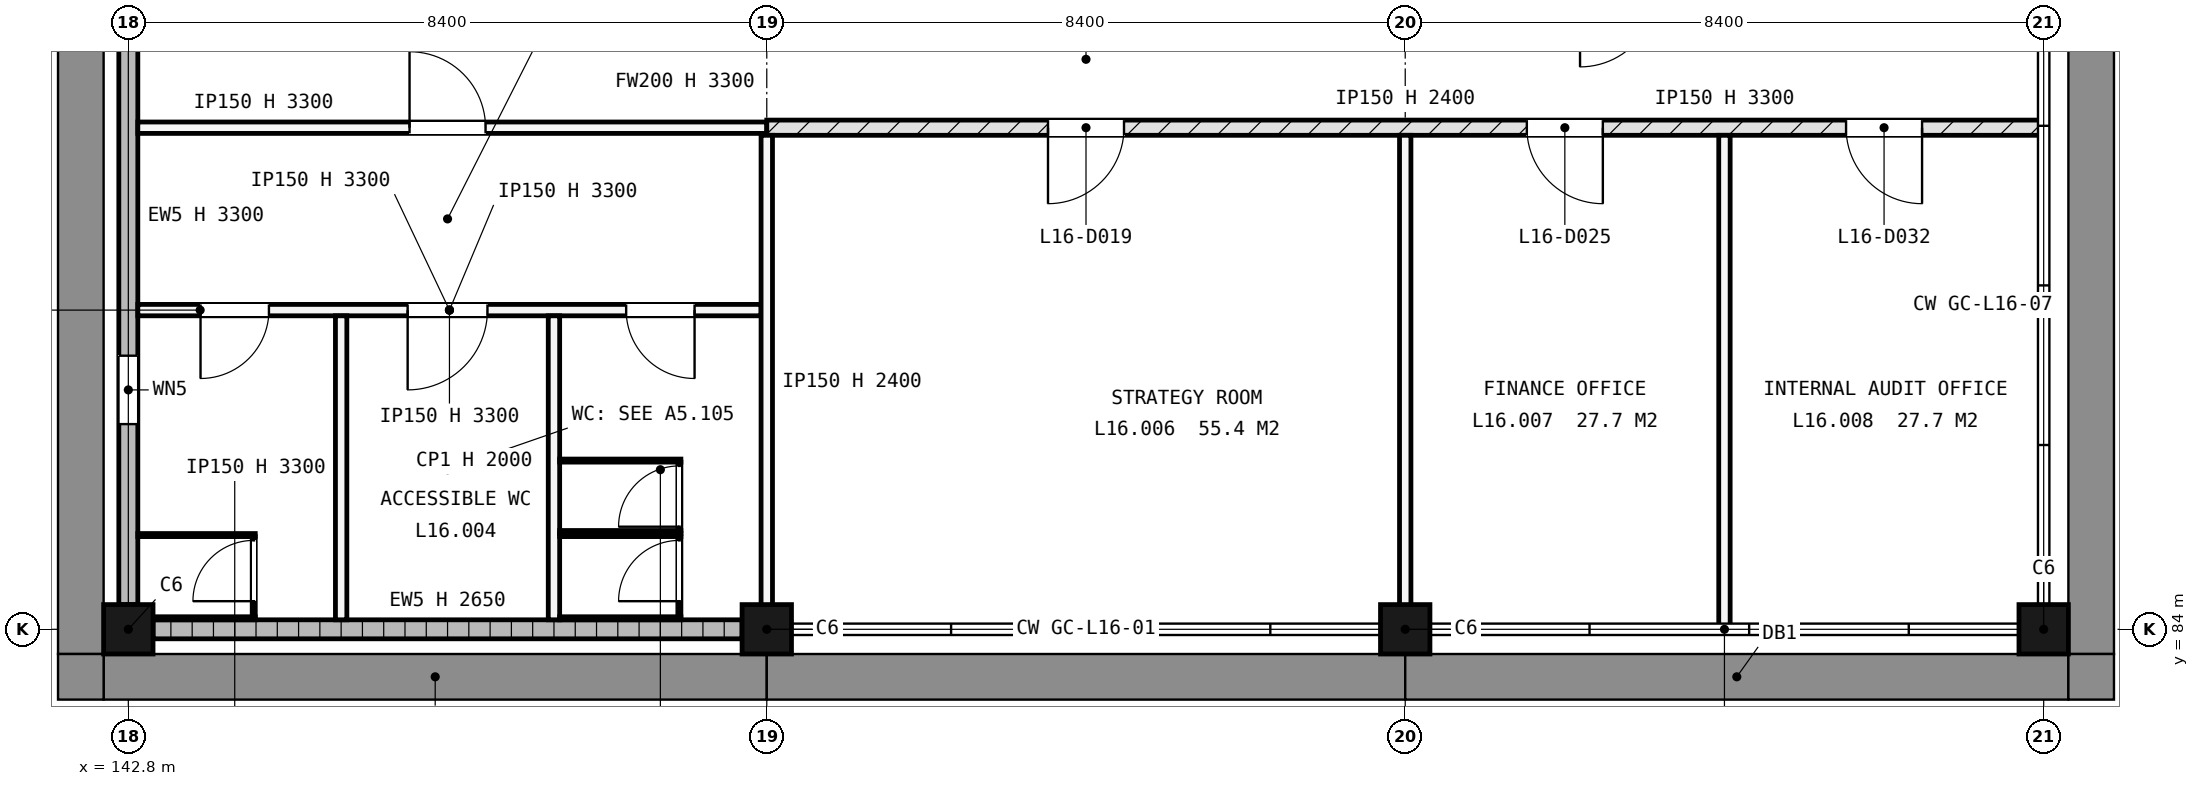
"""IFC4 building model, lengths in metres.
Left out: names, types, materials, properties, quantities, classifications, styles, units other than length and angle.
Written with IfcOpenShell. Run it as: python <this file> out.ifc"""

import sys

from ifc_helpers import new_model, si_unit, direction, frame, frame_2d, origin, origin_2d, place, context, subcontext, project, spatial, rectangle, extrude, element, fill, save


model = new_model("IFC4")
c1 = context("Model", 3, precision=1e-05, world=origin(), true_north=direction((0.0, 1.0)))
c2 = subcontext(c1, "Body", "Model", "MODEL_VIEW")
j1 = project(units=[si_unit("LENGTHUNIT", "METRE"), si_unit("PLANEANGLEUNIT", "RADIAN")], contexts=[c1])
p1 = place(None, origin())
s1 = spatial("IfcSite", under=j1, at=p1, CompositionType="ELEMENT")
p2 = place(p1, origin())
s2 = spatial("IfcBuilding", under=s1, at=p2, CompositionType="ELEMENT")
p3 = place(p2, frame((0.0, 0.0, 61.2)))
s3 = spatial("IfcBuildingStorey", under=s2, at=p3, CompositionType="ELEMENT", Elevation=61.2)
for number, where, z_axis, x_axis in (
    (1, (142.8, 84.0, -0.3), (0.0, 0.0, 1.0), (1.0, 0.0, 0.0)),
    (2, (151.2, 84.0, -0.3), (0.0, 0.0, 1.0), (1.0, 0.0, 0.0)),
    (3, (159.6, 84.0, -0.3), (0.0, 0.0, 1.0), (1.0, 0.0, 0.0)),
    (4, (168.0, 84.0, -0.3), (0.0, 0.0, 1.0), (1.0, 0.0, 0.0)),
):
    element("IfcColumn", number, at=place(p3, frame(where, z_axis=z_axis, x_axis=x_axis)), inside=s3, PredefinedType="COLUMN", context=c2, shape_type="SweptSolid", body=[
        extrude(rectangle(XDim=0.65, YDim=0.65, at=origin_2d()), origin(), (0.0, 0.0, 1.0), 3.6),
    ])
p4 = place(p3, frame((143.125, 84.0, 0.0), z_axis=(0.0, 0.0, 1.0), x_axis=(1.0, 0.0, 0.0)))
e5 = element("IfcWall", 5, at=p4, inside=s3, PredefinedType="STANDARD", context=c2, shape_type="SweptSolid", body=[
    extrude(rectangle(XDim=7.75, YDim=0.25, at=frame_2d((3.875, 0.0))), origin(), (0.0, 0.0, 1.0), 2.65),
])
p5 = place(p3, frame((142.8, 84.325, 0.0), z_axis=(0.0, 0.0, 1.0), x_axis=(0.0, 1.0, 0.0)))
e6 = element("IfcWall", 6, at=p5, inside=s3, PredefinedType="STANDARD", context=c2, shape_type="SweptSolid", body=[
    extrude(rectangle(XDim=7.875, YDim=0.25, at=frame_2d((3.938, 0.0))), origin(), (0.0, 0.0, 1.0), 3.3),
])
p6 = place(p5, frame((2.375, 0.0, 2.1)))
e7 = element("IfcOpeningElement", 7, at=p6, cuts=e6, PredefinedType="OPENING", context=c2, shape_type="SweptSolid", body=[
    extrude(rectangle(XDim=0.9, YDim=0.6, at=frame_2d((0.45, 0.3))), frame((0.0, 0.135, 0.0), z_axis=(0.0, -1.0, 0.0), x_axis=(1.0, 0.0, 0.0)), (0.0, 0.0, 1.0), 0.27),
])
p7 = place(p3, frame((142.925, 88.2, 0.0), z_axis=(0.0, 0.0, 1.0), x_axis=(1.0, 0.0, 0.0)))
e8 = element("IfcWall", 8, at=p7, inside=s3, PredefinedType="PARTITIONING", context=c2, shape_type="SweptSolid", body=[
    extrude(rectangle(XDim=8.2, YDim=0.15, at=frame_2d((4.1, 0.0))), origin(), (0.0, 0.0, 1.0), 3.3),
])
p8 = place(p7, frame((0.825, 0.0, 0.0)))
e9 = element("IfcOpeningElement", 9, at=p8, cuts=e8, PredefinedType="OPENING", context=c2, shape_type="SweptSolid", body=[
    extrude(rectangle(XDim=0.9, YDim=2.1, at=frame_2d((0.45, 1.05))), frame((0.0, 0.085, 0.0), z_axis=(0.0, -1.0, 0.0), x_axis=(1.0, 0.0, 0.0)), (0.0, 0.0, 1.0), 0.17),
])
p9 = place(p7, frame((3.55, 0.0, 0.0)))
e10 = element("IfcOpeningElement", 10, at=p9, cuts=e8, PredefinedType="OPENING", context=c2, shape_type="SweptSolid", body=[
    extrude(rectangle(XDim=1.05, YDim=2.25, at=frame_2d((0.525, 1.125))), frame((0.0, 0.085, 0.0), z_axis=(0.0, -1.0, 0.0), x_axis=(1.0, 0.0, 0.0)), (0.0, 0.0, 1.0), 0.17),
])
p10 = place(p7, frame((6.425, 0.0, 0.0)))
e11 = element("IfcOpeningElement", 11, at=p10, cuts=e8, PredefinedType="OPENING", context=c2, shape_type="SweptSolid", body=[
    extrude(rectangle(XDim=0.9, YDim=2.1, at=frame_2d((0.45, 1.05))), frame((0.0, 0.085, 0.0), z_axis=(0.0, -1.0, 0.0), x_axis=(1.0, 0.0, 0.0)), (0.0, 0.0, 1.0), 0.17),
])
p11 = place(p3, frame((142.925, 90.6, 0.0), z_axis=(0.0, 0.0, 1.0), x_axis=(1.0, 0.0, 0.0)))
e12 = element("IfcWall", 12, at=p11, inside=s3, PredefinedType="PARTITIONING", context=c2, shape_type="SweptSolid", body=[
    extrude(rectangle(XDim=8.275, YDim=0.15, at=frame_2d((4.137, 0.0))), origin(), (0.0, 0.0, 1.0), 3.3),
])
p12 = place(p11, frame((3.575, 0.0, 0.0)))
e13 = element("IfcOpeningElement", 13, at=p12, cuts=e12, PredefinedType="OPENING", context=c2, shape_type="SweptSolid", body=[
    extrude(rectangle(XDim=1.0, YDim=2.1, at=frame_2d((0.5, 1.05))), frame((0.0, 0.085, 0.0), z_axis=(0.0, -1.0, 0.0), x_axis=(1.0, 0.0, 0.0)), (0.0, 0.0, 1.0), 0.17),
])
p13 = place(p3, frame((151.2, 90.6, 0.0), z_axis=(0.0, 0.0, 1.0), x_axis=(1.0, 0.0, 0.0)))
e14 = element("IfcWall", 14, at=p13, inside=s3, PredefinedType="SOLIDWALL", context=c2, shape_type="SweptSolid", body=[
    extrude(rectangle(XDim=16.8, YDim=0.2, at=frame_2d((8.4, 0.0))), origin(), (0.0, 0.0, 1.0), 3.3),
])
p14 = place(p13, frame((3.7, 0.0, 0.0)))
e15 = element("IfcOpeningElement", 15, at=p14, cuts=e14, PredefinedType="OPENING", context=c2, shape_type="SweptSolid", body=[
    extrude(rectangle(XDim=1.0, YDim=2.1, at=frame_2d((0.5, 1.05))), frame((0.0, 0.11, 0.0), z_axis=(0.0, -1.0, 0.0), x_axis=(1.0, 0.0, 0.0)), (0.0, 0.0, 1.0), 0.22),
])
p15 = place(p13, frame((10.0, 0.0, 0.0)))
e16 = element("IfcOpeningElement", 16, at=p15, cuts=e14, PredefinedType="OPENING", context=c2, shape_type="SweptSolid", body=[
    extrude(rectangle(XDim=1.0, YDim=2.1, at=frame_2d((0.5, 1.05))), frame((0.0, 0.11, 0.0), z_axis=(0.0, -1.0, 0.0), x_axis=(1.0, 0.0, 0.0)), (0.0, 0.0, 1.0), 0.22),
])
p16 = place(p13, frame((14.2, 0.0, 0.0)))
e17 = element("IfcOpeningElement", 17, at=p16, cuts=e14, PredefinedType="OPENING", context=c2, shape_type="SweptSolid", body=[
    extrude(rectangle(XDim=1.0, YDim=2.1, at=frame_2d((0.5, 1.05))), frame((0.0, 0.11, 0.0), z_axis=(0.0, -1.0, 0.0), x_axis=(1.0, 0.0, 0.0)), (0.0, 0.0, 1.0), 0.22),
])
for number, where, z_axis, x_axis in (
    (18, (145.6, 84.125, 0.0), (0.0, 0.0, 1.0), (0.0, 1.0, 0.0)),
    (19, (148.4, 84.125, 0.0), (0.0, 0.0, 1.0), (0.0, 1.0, 0.0)),
):
    element("IfcWall", number, at=place(p3, frame(where, z_axis=z_axis, x_axis=x_axis)), inside=s3, PredefinedType="PARTITIONING", context=c2, shape_type="SweptSolid", body=[
        extrude(rectangle(XDim=4.0, YDim=0.15, at=frame_2d((2.0, 0.0))), origin(), (0.0, 0.0, 1.0), 3.3),
    ])
for number, where, z_axis, x_axis in (
    (20, (151.2, 84.0, 0.0), (0.0, 0.0, 1.0), (0.0, 1.0, 0.0)),
    (21, (159.6, 84.0, 0.0), (0.0, 0.0, 1.0), (0.0, 1.0, 0.0)),
):
    element("IfcWall", number, at=place(p3, frame(where, z_axis=z_axis, x_axis=x_axis)), inside=s3, PredefinedType="PARTITIONING", context=c2, shape_type="SweptSolid", body=[
        extrude(rectangle(XDim=6.5, YDim=0.15, at=frame_2d((3.25, 0.0))), origin(), (0.0, 0.0, 1.0), 2.4),
    ])
p17 = place(p3, frame((163.8, 84.0, 0.0), z_axis=(0.0, 0.0, 1.0), x_axis=(0.0, 1.0, 0.0)))
e22 = element("IfcWall", 22, at=p17, inside=s3, PredefinedType="PARTITIONING", context=c2, shape_type="SweptSolid", body=[
    extrude(rectangle(XDim=6.5, YDim=0.15, at=frame_2d((3.25, 0.0))), origin(), (0.0, 0.0, 1.0), 3.3),
])
p18 = place(p3, frame((142.93, 84.145, 0.0), z_axis=(0.0, 0.0, 1.0), x_axis=(1.0, 0.0, 0.0)))
e23 = element("IfcWall", 23, at=p18, inside=s3, PredefinedType="PARTITIONING", context=c2, shape_type="SweptSolid", body=[
    extrude(rectangle(XDim=1.54, YDim=0.04, at=frame_2d((0.77, 0.0))), origin(), (0.0, 0.0, 1.0), 2.0),
])
p19 = place(p3, frame((142.925, 85.24, 0.0), z_axis=(0.0, 0.0, 1.0), x_axis=(1.0, 0.0, 0.0)))
e24 = element("IfcWall", 24, at=p19, inside=s3, PredefinedType="PARTITIONING", context=c2, shape_type="SweptSolid", body=[
    extrude(rectangle(XDim=1.545, YDim=0.04, at=frame_2d((0.772, 0.0))), origin(), (0.0, 0.0, 1.0), 2.0),
])
p20 = place(p3, frame((144.45, 84.165, 0.0), z_axis=(0.0, 0.0, 1.0), x_axis=(0.0, 1.0, 0.0)))
e25 = element("IfcWall", 25, at=p20, inside=s3, PredefinedType="PARTITIONING", context=c2, shape_type="SweptSolid", body=[
    extrude(rectangle(XDim=1.055, YDim=0.04, at=frame_2d((0.527, 0.0))), origin(), (0.0, 0.0, 1.0), 2.0),
])
p21 = place(p20, frame((0.205, 0.0, 0.0)))
e26 = element("IfcOpeningElement", 26, at=p21, cuts=e25, PredefinedType="OPENING", context=c2, shape_type="SweptSolid", body=[
    extrude(rectangle(XDim=0.8, YDim=2.0, at=frame_2d((0.4, 1.0))), frame((0.0, 0.03, 0.0), z_axis=(0.0, -1.0, 0.0), x_axis=(1.0, 0.0, 0.0)), (0.0, 0.0, 1.0), 0.06),
])
for number, where, z_axis, x_axis in (
    (27, (148.475, 84.145, 0.0), (0.0, 0.0, 1.0), (1.0, 0.0, 0.0)),
    (28, (148.475, 85.24, 0.0), (0.0, 0.0, 1.0), (1.0, 0.0, 0.0)),
):
    element("IfcWall", number, at=place(p3, frame(where, z_axis=z_axis, x_axis=x_axis)), inside=s3, PredefinedType="PARTITIONING", context=c2, shape_type="SweptSolid", body=[
        extrude(rectangle(XDim=1.595, YDim=0.04, at=frame_2d((0.797, 0.0))), origin(), (0.0, 0.0, 1.0), 2.0),
    ])
p22 = place(p3, frame((150.05, 84.165, 0.0), z_axis=(0.0, 0.0, 1.0), x_axis=(0.0, 1.0, 0.0)))
e29 = element("IfcWall", 29, at=p22, inside=s3, PredefinedType="PARTITIONING", context=c2, shape_type="SweptSolid", body=[
    extrude(rectangle(XDim=1.055, YDim=0.04, at=frame_2d((0.527, 0.0))), origin(), (0.0, 0.0, 1.0), 2.0),
])
p23 = place(p22, frame((0.205, 0.0, 0.0)))
e30 = element("IfcOpeningElement", 30, at=p23, cuts=e29, PredefinedType="OPENING", context=c2, shape_type="SweptSolid", body=[
    extrude(rectangle(XDim=0.8, YDim=2.0, at=frame_2d((0.4, 1.0))), frame((0.0, 0.03, 0.0), z_axis=(0.0, -1.0, 0.0), x_axis=(1.0, 0.0, 0.0)), (0.0, 0.0, 1.0), 0.06),
])
for number, where, z_axis, x_axis in (
    (31, (148.475, 85.28, 0.0), (0.0, 0.0, 1.0), (1.0, 0.0, 0.0)),
    (32, (148.475, 86.22, 0.0), (0.0, 0.0, 1.0), (1.0, 0.0, 0.0)),
):
    element("IfcWall", number, at=place(p3, frame(where, z_axis=z_axis, x_axis=x_axis)), inside=s3, PredefinedType="PARTITIONING", context=c2, shape_type="SweptSolid", body=[
        extrude(rectangle(XDim=1.595, YDim=0.04, at=frame_2d((0.797, 0.0))), origin(), (0.0, 0.0, 1.0), 2.0),
    ])
p24 = place(p3, frame((150.05, 85.3, 0.0), z_axis=(0.0, 0.0, 1.0), x_axis=(0.0, 1.0, 0.0)))
e33 = element("IfcWall", 33, at=p24, inside=s3, PredefinedType="PARTITIONING", context=c2, shape_type="SweptSolid", body=[
    extrude(rectangle(XDim=0.9, YDim=0.04, at=frame_2d((0.45, 0.0))), origin(), (0.0, 0.0, 1.0), 2.0),
])
p25 = place(p24, frame((0.05, 0.0, 0.0)))
e34 = element("IfcOpeningElement", 34, at=p25, cuts=e33, PredefinedType="OPENING", context=c2, shape_type="SweptSolid", body=[
    extrude(rectangle(XDim=0.8, YDim=2.0, at=frame_2d((0.4, 1.0))), frame((0.0, 0.03, 0.0), z_axis=(0.0, -1.0, 0.0), x_axis=(1.0, 0.0, 0.0)), (0.0, 0.0, 1.0), 0.06),
])
p26 = place(p6, origin())
e35 = element("IfcWindow", 35, at=p26, inside=s3, PartitioningType="SINGLE_PANEL", PredefinedType="WINDOW", context=c2, shape_type="SweptSolid", body=[
    extrude(rectangle(XDim=0.9, YDim=0.6, at=frame_2d((0.45, 0.3))), frame((0.0, 0.03, 0.0), z_axis=(0.0, -1.0, 0.0), x_axis=(1.0, 0.0, 0.0)), (0.0, 0.0, 1.0), 0.06),
])
fill(e7, e35)
p27 = place(p8, origin())
e36 = element("IfcDoor", 36, at=p27, inside=s3, OperationType="SINGLE_SWING_LEFT", PredefinedType="DOOR", context=c2, shape_type="SweptSolid", body=[
    extrude(rectangle(XDim=0.9, YDim=2.1, at=frame_2d((0.45, 1.05))), frame((0.0, 0.025, 0.0), z_axis=(0.0, -1.0, 0.0), x_axis=(1.0, 0.0, 0.0)), (0.0, 0.0, 1.0), 0.05),
])
fill(e9, e36)
p28 = place(p9, origin())
e37 = element("IfcDoor", 37, at=p28, inside=s3, OperationType="SINGLE_SWING_LEFT", PredefinedType="DOOR", context=c2, shape_type="SweptSolid", body=[
    extrude(rectangle(XDim=1.05, YDim=2.25, at=frame_2d((0.525, 1.125))), frame((0.0, 0.025, 0.0), z_axis=(0.0, -1.0, 0.0), x_axis=(1.0, 0.0, 0.0)), (0.0, 0.0, 1.0), 0.05),
])
fill(e10, e37)
p29 = place(p10, origin())
e38 = element("IfcDoor", 38, at=p29, inside=s3, OperationType="SINGLE_SWING_RIGHT", PredefinedType="DOOR", context=c2, shape_type="SweptSolid", body=[
    extrude(rectangle(XDim=0.9, YDim=2.1, at=frame_2d((0.45, 1.05))), frame((0.0, 0.025, 0.0), z_axis=(0.0, -1.0, 0.0), x_axis=(1.0, 0.0, 0.0)), (0.0, 0.0, 1.0), 0.05),
])
fill(e11, e38)
p30 = place(p14, origin())
e39 = element("IfcDoor", 39, at=p30, inside=s3, OperationType="SINGLE_SWING_LEFT", PredefinedType="DOOR", context=c2, shape_type="SweptSolid", body=[
    extrude(rectangle(XDim=1.0, YDim=2.1, at=frame_2d((0.5, 1.05))), frame((0.0, 0.025, 0.0), z_axis=(0.0, -1.0, 0.0), x_axis=(1.0, 0.0, 0.0)), (0.0, 0.0, 1.0), 0.05),
])
fill(e15, e39)
p31 = place(p15, origin())
e40 = element("IfcDoor", 40, at=p31, inside=s3, OperationType="SINGLE_SWING_RIGHT", PredefinedType="DOOR", context=c2, shape_type="SweptSolid", body=[
    extrude(rectangle(XDim=1.0, YDim=2.1, at=frame_2d((0.5, 1.05))), frame((0.0, 0.025, 0.0), z_axis=(0.0, -1.0, 0.0), x_axis=(1.0, 0.0, 0.0)), (0.0, 0.0, 1.0), 0.05),
])
fill(e16, e40)
p32 = place(p16, origin())
e41 = element("IfcDoor", 41, at=p32, inside=s3, OperationType="SINGLE_SWING_RIGHT", PredefinedType="DOOR", context=c2, shape_type="SweptSolid", body=[
    extrude(rectangle(XDim=1.0, YDim=2.1, at=frame_2d((0.5, 1.05))), frame((0.0, 0.025, 0.0), z_axis=(0.0, -1.0, 0.0), x_axis=(1.0, 0.0, 0.0)), (0.0, 0.0, 1.0), 0.05),
])
fill(e17, e41)
p33 = place(p12, origin())
e42 = element("IfcDoor", 42, at=p33, inside=s3, OperationType="SINGLE_SWING_RIGHT", PredefinedType="DOOR", context=c2, shape_type="SweptSolid", body=[
    extrude(rectangle(XDim=1.0, YDim=2.1, at=frame_2d((0.5, 1.05))), frame((0.0, 0.025, 0.0), z_axis=(0.0, -1.0, 0.0), x_axis=(1.0, 0.0, 0.0)), (0.0, 0.0, 1.0), 0.05),
])
fill(e13, e42)
p34 = place(p21, origin())
e43 = element("IfcDoor", 43, at=p34, inside=s3, OperationType="SINGLE_SWING_LEFT", PredefinedType="DOOR", context=c2, shape_type="SweptSolid", body=[
    extrude(rectangle(XDim=0.8, YDim=2.0, at=frame_2d((0.4, 1.0))), frame((0.0, 0.02, 0.0), z_axis=(0.0, -1.0, 0.0), x_axis=(1.0, 0.0, 0.0)), (0.0, 0.0, 1.0), 0.04),
])
fill(e26, e43)
p35 = place(p23, origin())
e44 = element("IfcDoor", 44, at=p35, inside=s3, OperationType="SINGLE_SWING_LEFT", PredefinedType="DOOR", context=c2, shape_type="SweptSolid", body=[
    extrude(rectangle(XDim=0.8, YDim=2.0, at=frame_2d((0.4, 1.0))), frame((0.0, 0.02, 0.0), z_axis=(0.0, -1.0, 0.0), x_axis=(1.0, 0.0, 0.0)), (0.0, 0.0, 1.0), 0.04),
])
fill(e30, e44)
p36 = place(p25, origin())
e45 = element("IfcDoor", 45, at=p36, inside=s3, OperationType="SINGLE_SWING_LEFT", PredefinedType="DOOR", context=c2, shape_type="SweptSolid", body=[
    extrude(rectangle(XDim=0.8, YDim=2.0, at=frame_2d((0.4, 1.0))), frame((0.0, 0.02, 0.0), z_axis=(0.0, -1.0, 0.0), x_axis=(1.0, 0.0, 0.0)), (0.0, 0.0, 1.0), 0.04),
])
fill(e34, e45)
save(model, sys.argv[1])
